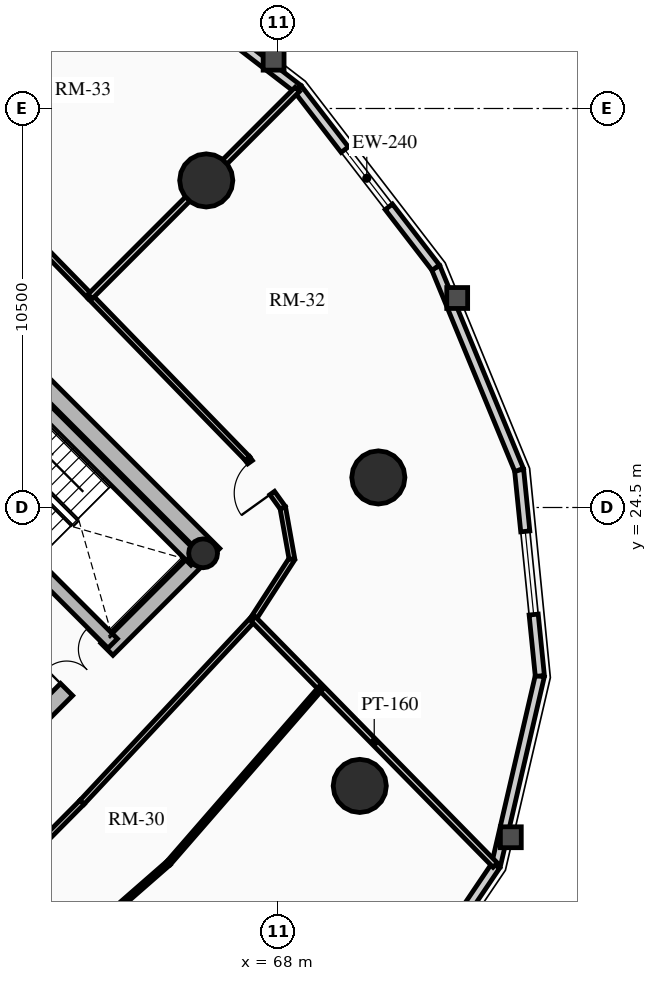
"""IFC4 building model, lengths in metres.
Left out: names, types, materials, properties, quantities, classifications, styles, units other than length and angle.
Written with IfcOpenShell. Run it as: python <this file> out.ifc"""

import sys

from ifc_helpers import new_model, si_unit, direction, frame, frame_2d, origin, origin_2d, place, context, subcontext, project, spatial, rectangle, circle, hollow_circle, extrude, source, transform, mapped, element, fill, save


model = new_model("IFC4")
c1 = context("Model", 3, precision=1e-05, world=origin(), true_north=direction((0.0, 1.0)))
c2 = subcontext(c1, "Body", "Model", "MODEL_VIEW")
j1 = project(units=[si_unit("LENGTHUNIT", "METRE"), si_unit("PLANEANGLEUNIT", "RADIAN")], contexts=[c1])
p1 = place(None, origin())
s1 = spatial("IfcSite", under=j1, at=p1, CompositionType="ELEMENT")
p2 = place(p1, origin())
s2 = spatial("IfcBuilding", under=s1, at=p2, CompositionType="ELEMENT")
p3 = place(p2, frame((0.0, 0.0, 90.52)))
s3 = spatial("IfcBuildingStorey", under=s2, at=p3, CompositionType="ELEMENT", Elevation=90.52)
p4 = place(p3, frame((66.303, 23.263, 0.0), z_axis=(0.0, 0.0, 1.0), x_axis=(-0.707106781187, 0.707106781187, 0.0)))
e1 = element("IfcWall", 1, at=p4, inside=s3, PredefinedType="SHEAR", context=c2, shape_type="SweptSolid", body=[
    extrude(rectangle(XDim=14.2, YDim=0.45, at=frame_2d((7.1, 0.0))), origin(), (0.0, 0.0, 1.0), 2.91),
])
p5 = place(p3, frame((58.578, 15.856, 0.0), z_axis=(0.0, 0.0, 1.0), x_axis=(0.707106781187, 0.707106781187, 0.0)))
e2 = element("IfcWall", 2, at=p5, inside=s3, PredefinedType="SHEAR", context=c2, shape_type="SweptSolid", body=[
    extrude(rectangle(XDim=10.7, YDim=0.45, at=frame_2d((5.35, 0.0))), origin(), (0.0, 0.0, 1.0), 2.91),
])
m1 = source(origin(), c2, "Body", "SweptSolid", [
    extrude(rectangle(XDim=1.5, YDim=2.02, at=frame_2d((0.75, 1.01))), frame((0.0, 0.235, 0.0), z_axis=(0.0, -1.0, 0.0), x_axis=(1.0, 0.0, 0.0)), (0.0, 0.0, 1.0), 0.47),
])
p6 = place(p5, frame((5.45, 0.0, 0.0)))
e3 = element("IfcOpeningElement", 3, at=p6, cuts=e2, PredefinedType="OPENING", context=c2, shape_type="MappedRepresentation", body=[
    mapped(m1, transform((0.0, 0.0, 0.0), x_axis=(1.0, 0.0, 0.0), y_axis=(0.0, 1.0, 0.0), z_axis=(0.0, 0.0, 1.0), scale=1.0)),
])
p7 = place(p3, frame((63.645, 20.922, 0.0), z_axis=(0.0, 0.0, 1.0), x_axis=(-0.707106781187, 0.707106781187, 0.0)))
e4 = element("IfcWall", 4, at=p7, inside=s3, PredefinedType="SHEAR", context=c2, shape_type="SweptSolid", body=[
    extrude(rectangle(XDim=13.75, YDim=0.35, at=frame_2d((6.875, 0.0))), origin(), (0.0, 0.0, 1.0), 2.91),
])
m2 = source(origin(), c2, "Body", "SweptSolid", [
    extrude(rectangle(XDim=1.1, YDim=2.015, at=frame_2d((0.55, 1.007))), frame((0.0, 0.185, 0.0), z_axis=(0.0, -1.0, 0.0), x_axis=(1.0, 0.0, 0.0)), (0.0, 0.0, 1.0), 0.37),
])
p8 = place(p7, frame((10.0, 0.0, 0.0)))
e5 = element("IfcOpeningElement", 5, at=p8, cuts=e4, PredefinedType="OPENING", context=c2, shape_type="MappedRepresentation", body=[
    mapped(m2, transform((0.0, 0.0, 0.0), x_axis=(1.0, 0.0, 0.0), y_axis=(0.0, 1.0, 0.0), z_axis=(0.0, 0.0, 1.0), scale=1.0)),
])
p9 = place(p7, frame((12.0, 0.0, 0.0)))
e6 = element("IfcOpeningElement", 6, at=p9, cuts=e4, PredefinedType="OPENING", context=c2, shape_type="MappedRepresentation", body=[
    mapped(m2, transform((0.0, 0.0, 0.0), x_axis=(1.0, 0.0, 0.0), y_axis=(0.0, 1.0, 0.0), z_axis=(0.0, 0.0, 1.0), scale=1.0)),
])
m3 = source(origin(), c2, "Body", "SweptSolid", [
    extrude(rectangle(XDim=1.15, YDim=2.02, at=frame_2d((0.575, 1.01))), frame((0.0, 0.185, 0.0), z_axis=(0.0, -1.0, 0.0), x_axis=(1.0, 0.0, 0.0)), (0.0, 0.0, 1.0), 0.37),
])
p10 = place(p7, frame((5.305, 0.0, 0.0)))
e7 = element("IfcOpeningElement", 7, at=p10, cuts=e4, PredefinedType="OPENING", context=c2, shape_type="MappedRepresentation", body=[
    mapped(m3, transform((0.0, 0.0, 0.0), x_axis=(1.0, 0.0, 0.0), y_axis=(0.0, 1.0, 0.0), z_axis=(0.0, 0.0, 1.0), scale=1.0)),
])
p11 = place(p3, frame((65.83, 23.107, 0.0), z_axis=(0.0, 0.0, 1.0), x_axis=(-0.707088616009, 0.707124945897, 0.0)))
e8 = element("IfcWall", 8, at=p11, inside=s3, PredefinedType="SHEAR", context=c2, shape_type="SweptSolid", body=[
    extrude(rectangle(XDim=6.72, YDim=0.35, at=frame_2d((3.36, 0.0))), origin(), (0.0, 0.0, 1.0), 2.91),
])
p12 = place(p3, frame((66.024, 23.294, 0.0), z_axis=(0.0, 0.0, 1.0), x_axis=(0.707106781187, 0.707106781187, 0.0)))
e9 = element("IfcColumn", 9, at=p12, inside=s3, PredefinedType="COLUMN", context=c2, shape_type="SweptSolid", body=[
    extrude(hollow_circle(Radius=0.38, WallThickness=0.032, at=origin_2d()), origin(), (0.0, 0.0, 1.0), 2.91),
])
for number, where, z_axis, x_axis in (
    (10, (66.107, 33.107, 0.0), (0.0, 0.0, 1.0), (1.0, 0.0, 0.0)),
    (11, (70.146, 17.173, 0.0), (0.0, 0.0, 1.0), (1.0, 0.0, 0.0)),
    (12, (70.635, 25.291, 0.0), (0.0, 0.0, 1.0), (1.0, 0.0, 0.0)),
):
    element("IfcColumn", number, at=place(p3, frame(where, z_axis=z_axis, x_axis=x_axis)), inside=s3, PredefinedType="USERDEFINED", context=c2, shape_type="SweptSolid", body=[
        extrude(circle(Radius=0.7, at=origin_2d()), origin(), (0.0, 0.0, 1.0), 2.91),
    ])
p13 = place(p3, frame((63.811, 39.145, 0.0), z_axis=(0.0, 0.0, 1.0), x_axis=(0.791982052206, -0.61054437102, 0.0)))
e13 = element("IfcWall", 13, at=p13, inside=s3, PredefinedType="SOLIDWALL", context=c2, shape_type="SweptSolid", body=[
    extrude(rectangle(XDim=5.942, YDim=0.24, at=frame_2d((2.971, 0.0))), origin(), (0.0, 0.0, 1.0), 2.179),
])
p14 = place(p3, frame((73.729, 15.08, 0.0), z_axis=(0.0, 0.0, 1.0), x_axis=(-0.559572880421, -0.828781148131, 0.0)))
e14 = element("IfcWall", 14, at=p14, inside=s3, PredefinedType="SOLIDWALL", context=c2, shape_type="SweptSolid", body=[
    extrude(rectangle(XDim=4.905, YDim=0.24, at=frame_2d((2.452, 0.0))), origin(), (0.0, 0.0, 1.0), 2.179),
])
m4 = source(origin(), c2, "Body", "SweptSolid", [
    extrude(rectangle(XDim=1.9, YDim=1.35, at=frame_2d((0.95, 0.675))), frame((0.0, 0.13, 0.0), z_axis=(0.0, -1.0, 0.0), x_axis=(1.0, 0.0, 0.0)), (0.0, 0.0, 1.0), 0.26),
])
p15 = place(p14, frame((1.502, 0.0, 0.65)))
e15 = element("IfcOpeningElement", 15, at=p15, cuts=e14, PredefinedType="OPENING", context=c2, shape_type="MappedRepresentation", body=[
    mapped(m4, transform((0.0, 0.0, 0.0), x_axis=(1.0, 0.0, 0.0), y_axis=(0.0, 1.0, 0.0), z_axis=(0.0, 0.0, 1.0), scale=1.0)),
])
p16 = place(p3, frame((74.885, 20.067, 0.0), z_axis=(0.0, 0.0, 1.0), x_axis=(-0.225834725257, -0.974165631126, 0.0)))
e16 = element("IfcWall", 16, at=p16, inside=s3, PredefinedType="SOLIDWALL", context=c2, shape_type="SweptSolid", body=[
    extrude(rectangle(XDim=5.119, YDim=0.24, at=frame_2d((2.56, 0.0))), origin(), (0.0, 0.0, 1.0), 2.179),
])
p17 = place(p3, frame((74.339, 25.487, 0.0), z_axis=(0.0, 0.0, 1.0), x_axis=(0.10015591906, -0.994971754311, 0.0)))
e17 = element("IfcWall", 17, at=p17, inside=s3, PredefinedType="SOLIDWALL", context=c2, shape_type="SweptSolid", body=[
    extrude(rectangle(XDim=5.448, YDim=0.24, at=frame_2d((2.724, 0.0))), origin(), (0.0, 0.0, 1.0), 2.179),
])
m5 = source(origin(), c2, "Body", "SweptSolid", [
    extrude(rectangle(XDim=2.2, YDim=1.35, at=frame_2d((1.1, 0.675))), frame((0.0, 0.13, 0.0), z_axis=(0.0, -1.0, 0.0), x_axis=(1.0, 0.0, 0.0)), (0.0, 0.0, 1.0), 0.26),
])
p18 = place(p17, frame((1.624, 0.0, 0.65)))
e18 = element("IfcOpeningElement", 18, at=p18, cuts=e17, PredefinedType="OPENING", context=c2, shape_type="MappedRepresentation", body=[
    mapped(m5, transform((0.0, 0.0, 0.0), x_axis=(1.0, 0.0, 0.0), y_axis=(0.0, 1.0, 0.0), z_axis=(0.0, 0.0, 1.0), scale=1.0)),
])
p19 = place(p3, frame((72.145, 30.811, 0.0), z_axis=(0.0, 0.0, 1.0), x_axis=(0.381027003055, -0.924563909604, 0.0)))
e19 = element("IfcWall", 19, at=p19, inside=s3, PredefinedType="SOLIDWALL", context=c2, shape_type="SweptSolid", body=[
    extrude(rectangle(XDim=5.758, YDim=0.24, at=frame_2d((2.879, 0.0))), origin(), (0.0, 0.0, 1.0), 2.179),
])
p20 = place(p3, frame((68.517, 35.517, 0.0), z_axis=(0.0, 0.0, 1.0), x_axis=(0.61054437102, -0.791982052206, 0.0)))
e20 = element("IfcWall", 20, at=p20, inside=s3, PredefinedType="SOLIDWALL", context=c2, shape_type="SweptSolid", body=[
    extrude(rectangle(XDim=5.942, YDim=0.24, at=frame_2d((2.971, 0.0))), origin(), (0.0, 0.0, 1.0), 2.179),
])
p21 = place(p20, frame((2.021, 0.0, 0.65)))
e21 = element("IfcOpeningElement", 21, at=p21, cuts=e20, PredefinedType="OPENING", context=c2, shape_type="MappedRepresentation", body=[
    mapped(m4, transform((0.0, 0.0, 0.0), x_axis=(1.0, 0.0, 0.0), y_axis=(0.0, 1.0, 0.0), z_axis=(0.0, 0.0, 1.0), scale=1.0)),
])
p22 = place(p3, frame((63.051, 30.051, 0.0), z_axis=(0.0, 0.0, 1.0), x_axis=(-0.698846622234, 0.715271555839, 0.0)))
e22 = element("IfcWall", 22, at=p22, inside=s3, PredefinedType="PARTITIONING", context=c2, shape_type="SweptSolid", body=[
    extrude(rectangle(XDim=6.05, YDim=0.15, at=frame_2d((3.025, 0.0))), origin(), (0.0, 0.0, 1.0), 2.225),
])
p23 = place(p3, frame((60.515, 14.401, 0.0), z_axis=(0.0, 0.0, 1.0), x_axis=(0.704179607439, 0.710021887316, 0.0)))
e23 = element("IfcWall", 23, at=p23, inside=s3, PredefinedType="PARTITIONING", context=c2, shape_type="SweptSolid", body=[
    extrude(rectangle(XDim=3.301, YDim=0.15, at=frame_2d((1.651, 0.0))), origin(), (0.0, 0.0, 1.0), 2.225),
])
p24 = place(p3, frame((62.839, 16.745, 0.0), z_axis=(0.0, 0.0, 1.0), x_axis=(0.682386779427, 0.73099130177, 0.0)))
e24 = element("IfcWall", 24, at=p24, inside=s3, PredefinedType="PARTITIONING", context=c2, shape_type="SweptSolid", body=[
    extrude(rectangle(XDim=6.6, YDim=0.15, at=frame_2d((3.3, 0.0))), origin(), (0.0, 0.0, 1.0), 2.225),
])
p25 = place(p3, frame((67.343, 21.569, 0.0), z_axis=(0.0, 0.0, 1.0), x_axis=(0.542722446786, 0.83991210597, 0.0)))
e25 = element("IfcWall", 25, at=p25, inside=s3, PredefinedType="PARTITIONING", context=c2, shape_type="SweptSolid", body=[
    extrude(rectangle(XDim=1.876, YDim=0.15, at=frame_2d((0.938, 0.0))), origin(), (0.0, 0.0, 1.0), 2.225),
])
p26 = place(p3, frame((68.362, 23.145, 0.0), z_axis=(0.0, 0.0, 1.0), x_axis=(-0.175605524171, 0.984460613677, 0.0)))
e26 = element("IfcWall", 26, at=p26, inside=s3, PredefinedType="PARTITIONING", context=c2, shape_type="SweptSolid", body=[
    extrude(rectangle(XDim=1.369, YDim=0.15, at=frame_2d((0.685, 0.0))), origin(), (0.0, 0.0, 1.0), 2.225),
])
p27 = place(p3, frame((68.121, 24.493, 0.0), z_axis=(0.0, 0.0, 1.0), x_axis=(-0.583188677624, 0.812336732083, 0.0)))
e27 = element("IfcWall", 27, at=p27, inside=s3, PredefinedType="PARTITIONING", context=c2, shape_type="SweptSolid", body=[
    extrude(rectangle(XDim=1.597, YDim=0.15, at=frame_2d((0.799, 0.0))), origin(), (0.0, 0.0, 1.0), 2.225),
])
m6 = source(origin(), c2, "Body", "SweptSolid", [
    extrude(rectangle(XDim=1.0, YDim=2.015, at=frame_2d((0.5, 1.007))), frame((0.0, 0.085, 0.0), z_axis=(0.0, -1.0, 0.0), x_axis=(1.0, 0.0, 0.0)), (0.0, 0.0, 1.0), 0.17),
])
p28 = place(p27, frame((0.477, 0.0, 0.0)))
e28 = element("IfcOpeningElement", 28, at=p28, cuts=e27, PredefinedType="OPENING", context=c2, shape_type="MappedRepresentation", body=[
    mapped(m6, transform((0.0, 0.0, 0.0), x_axis=(1.0, 0.0, 0.0), y_axis=(0.0, 1.0, 0.0), z_axis=(0.0, 0.0, 1.0), scale=1.0)),
])
p29 = place(p3, frame((67.19, 25.791, 0.0), z_axis=(0.0, 0.0, 1.0), x_axis=(-0.696839457851, 0.717227139742, 0.0)))
e29 = element("IfcWall", 29, at=p29, inside=s3, PredefinedType="PARTITIONING", context=c2, shape_type="SweptSolid", body=[
    extrude(rectangle(XDim=5.939, YDim=0.15, at=frame_2d((2.97, 0.0))), origin(), (0.0, 0.0, 1.0), 2.655),
])
p30 = place(p3, frame((63.051, 30.051, 0.0), z_axis=(0.0, 0.0, 1.0), x_axis=(0.707106781187, 0.707106781187, 0.0)))
e30 = element("IfcWall", 30, at=p30, inside=s3, PredefinedType="PARTITIONING", context=c2, shape_type="SweptSolid", body=[
    extrude(rectangle(XDim=7.711, YDim=0.16, at=frame_2d((3.855, 0.0))), origin(), (0.0, 0.0, 1.0), 2.179),
])
p31 = place(p3, frame((67.343, 21.569, 0.0), z_axis=(0.0, 0.0, 1.0), x_axis=(0.700899237588, -0.713260302238, 0.0)))
e31 = element("IfcWall", 31, at=p31, inside=s3, PredefinedType="PARTITIONING", context=c2, shape_type="SweptSolid", body=[
    extrude(rectangle(XDim=9.085, YDim=0.16, at=frame_2d((4.543, 0.0))), origin(), (0.0, 0.0, 1.0), 2.179),
])
p32 = place(p3, frame((62.306, 12.689, 0.0), z_axis=(0.0, 0.0, 1.0), x_axis=(0.753127589311, 0.657874482115, 0.0)))
e32 = element("IfcWall", 32, at=p32, inside=s3, PredefinedType="PARTITIONING", context=c2, shape_type="SweptSolid", body=[
    extrude(rectangle(XDim=3.732, YDim=0.125, at=frame_2d((1.866, 0.0))), origin(), (0.0, 0.0, 1.0), 2.225),
])
p33 = place(p3, frame((65.116, 15.145, 0.0), z_axis=(0.0, 0.0, 1.0), x_axis=(0.656272685344, 0.75452379848, 0.0)))
e33 = element("IfcWall", 33, at=p33, inside=s3, PredefinedType="PARTITIONING", context=c2, shape_type="SweptSolid", body=[
    extrude(rectangle(XDim=6.11, YDim=0.125, at=frame_2d((3.055, 0.0))), origin(), (0.0, 0.0, 1.0), 2.225),
])
m7 = source(origin(), c2, "Body", "SweptSolid", [
    extrude(rectangle(XDim=2.2, YDim=1.35, at=frame_2d((1.1, 0.675))), frame((0.0, 0.03, 0.0), z_axis=(0.0, -1.0, 0.0), x_axis=(1.0, 0.0, 0.0)), (0.0, 0.0, 1.0), 0.06),
])
p34 = place(p18, origin())
e34 = element("IfcWindow", 34, at=p34, inside=s3, PartitioningType="DOUBLE_PANEL_VERTICAL", PredefinedType="WINDOW", context=c2, shape_type="MappedRepresentation", body=[
    mapped(m7, transform((0.0, 0.0, 0.0), x_axis=(1.0, 0.0, 0.0), y_axis=(0.0, 1.0, 0.0), z_axis=(0.0, 0.0, 1.0), scale=1.0)),
])
fill(e18, e34)
m8 = source(origin(), c2, "Body", "SweptSolid", [
    extrude(rectangle(XDim=1.9, YDim=1.35, at=frame_2d((0.95, 0.675))), frame((0.0, 0.03, 0.0), z_axis=(0.0, -1.0, 0.0), x_axis=(1.0, 0.0, 0.0)), (0.0, 0.0, 1.0), 0.06),
])
p35 = place(p21, origin())
e35 = element("IfcWindow", 35, at=p35, inside=s3, PartitioningType="DOUBLE_PANEL_VERTICAL", PredefinedType="WINDOW", context=c2, shape_type="MappedRepresentation", body=[
    mapped(m8, transform((0.0, 0.0, 0.0), x_axis=(1.0, 0.0, 0.0), y_axis=(0.0, 1.0, 0.0), z_axis=(0.0, 0.0, 1.0), scale=1.0)),
])
fill(e21, e35)
m9 = source(origin(), c2, "Body", "SweptSolid", [
    extrude(rectangle(XDim=1.5, YDim=2.02, at=frame_2d((0.75, 1.01))), frame((0.0, 0.025, 0.0), z_axis=(0.0, -1.0, 0.0), x_axis=(1.0, 0.0, 0.0)), (0.0, 0.0, 1.0), 0.05),
])
p36 = place(p6, origin())
e36 = element("IfcDoor", 36, at=p36, inside=s3, OperationType="DOUBLE_DOOR_SINGLE_SWING", PredefinedType="DOOR", context=c2, shape_type="MappedRepresentation", body=[
    mapped(m9, transform((0.0, 0.0, 0.0), x_axis=(1.0, 0.0, 0.0), y_axis=(0.0, 1.0, 0.0), z_axis=(0.0, 0.0, 1.0), scale=1.0)),
])
fill(e3, e36)
m10 = source(origin(), c2, "Body", "SweptSolid", [
    extrude(rectangle(XDim=1.0, YDim=2.015, at=frame_2d((0.5, 1.007))), frame((0.0, 0.025, 0.0), z_axis=(0.0, -1.0, 0.0), x_axis=(1.0, 0.0, 0.0)), (0.0, 0.0, 1.0), 0.05),
])
p37 = place(p28, origin())
e37 = element("IfcDoor", 37, at=p37, inside=s3, OperationType="SINGLE_SWING_LEFT", PredefinedType="DOOR", context=c2, shape_type="MappedRepresentation", body=[
    mapped(m10, transform((0.0, 0.0, 0.0), x_axis=(1.0, 0.0, 0.0), y_axis=(0.0, 1.0, 0.0), z_axis=(0.0, 0.0, 1.0), scale=1.0)),
])
fill(e28, e37)
save(model, sys.argv[1])
